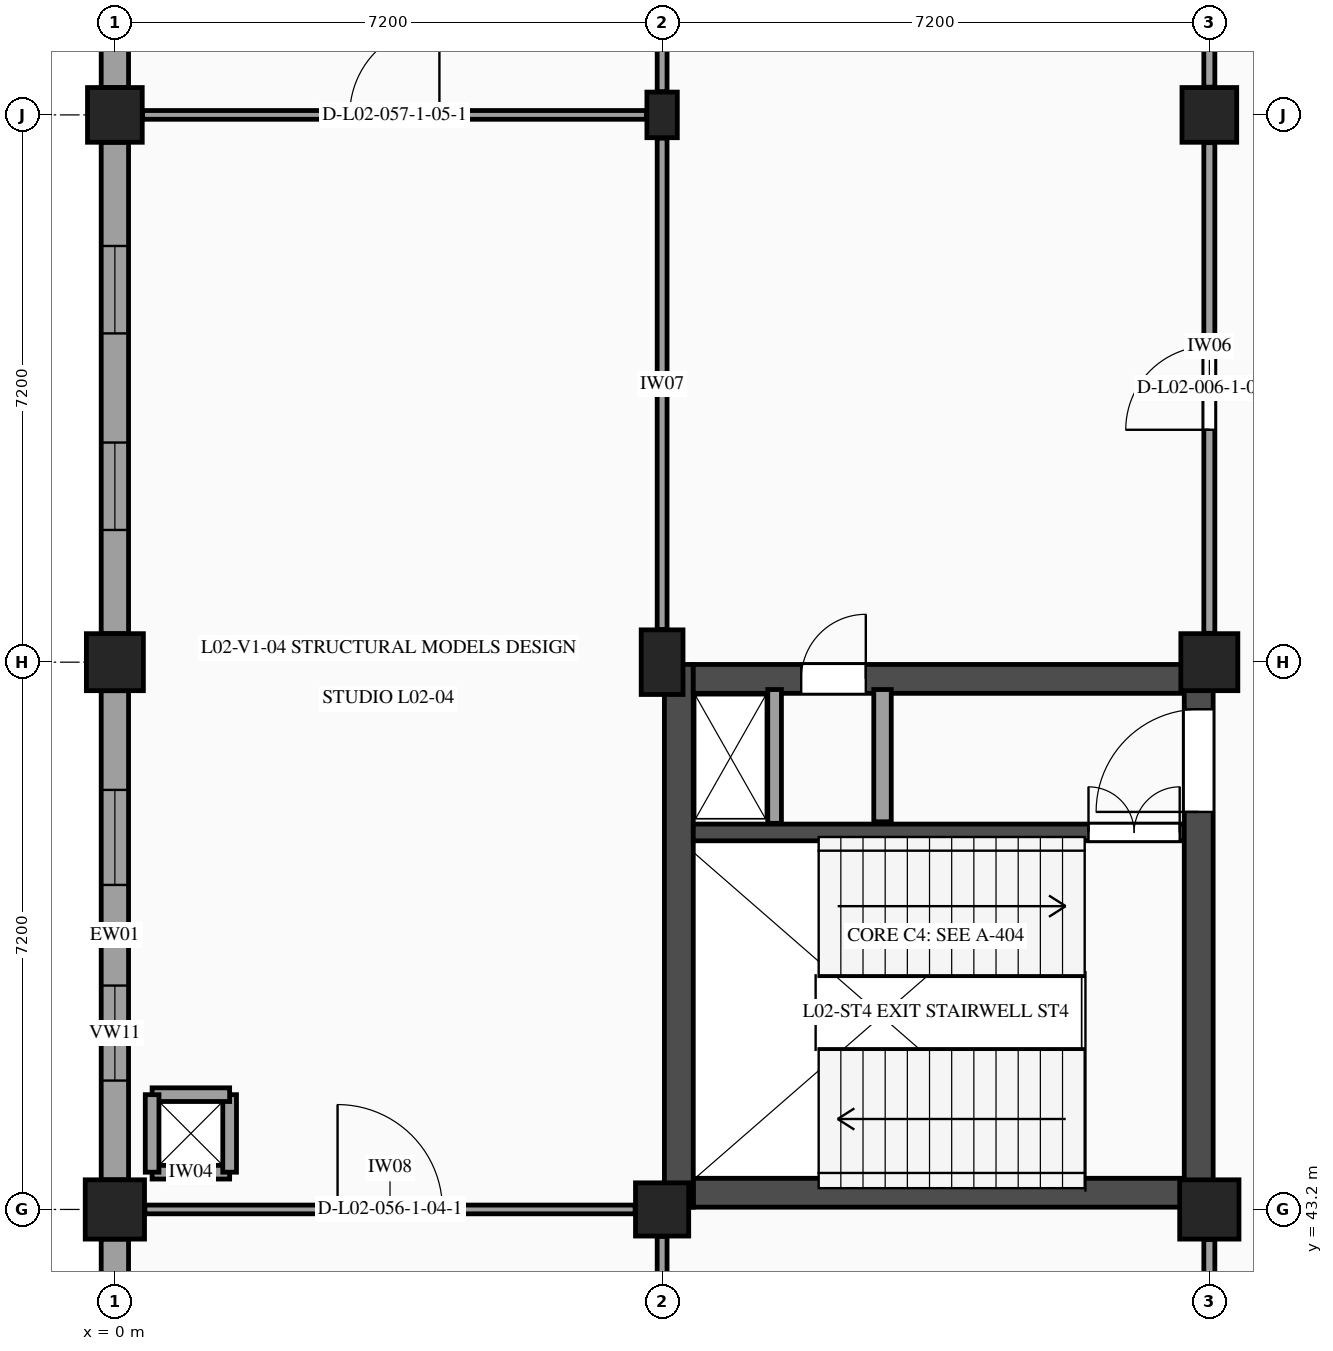
"""IFC4 building model, lengths in metres.
Left out: names, types, materials, properties, quantities, classifications, styles, units other than length and angle.
Written with IfcOpenShell. Run it as: python <this file> out.ifc"""

import sys

from ifc_helpers import new_model, si_unit, direction, frame, frame_2d, origin, origin_2d, place, context, subcontext, project, spatial, rectangle, extrude, element, fill, save


model = new_model("IFC4")
c1 = context("Model", 3, precision=1e-05, world=origin(), true_north=direction((0.0, 1.0)))
c2 = subcontext(c1, "Body", "Model", "MODEL_VIEW")
j1 = project(units=[si_unit("LENGTHUNIT", "METRE"), si_unit("PLANEANGLEUNIT", "RADIAN")], contexts=[c1])
p1 = place(None, origin())
s1 = spatial("IfcSite", under=j1, at=p1, CompositionType="ELEMENT")
p2 = place(p1, origin())
s2 = spatial("IfcBuilding", under=s1, at=p2, CompositionType="ELEMENT")
p3 = place(p2, frame((0.0, 0.0, 9.9)))
s3 = spatial("IfcBuildingStorey", under=s2, at=p3, CompositionType="ELEMENT", Elevation=9.9)
p4 = place(p3, frame((0.0, 43.2, 0.0), z_axis=(0.0, 0.0, 1.0), x_axis=(1.0, 0.0, 0.0)))
e1 = element("IfcColumn", 1, at=p4, inside=s3, PredefinedType="COLUMN", context=c2, shape_type="SweptSolid", body=[
    extrude(rectangle(XDim=0.78, YDim=0.78, at=origin_2d()), origin(), (0.0, 0.0, 1.0), 4.5),
])
p5 = place(p3, frame((0.0, 50.4, 0.0), z_axis=(0.0, 0.0, 1.0), x_axis=(1.0, 0.0, 0.0)))
e2 = element("IfcColumn", 2, at=p5, inside=s3, PredefinedType="COLUMN", context=c2, shape_type="SweptSolid", body=[
    extrude(rectangle(XDim=0.75, YDim=0.75, at=origin_2d()), origin(), (0.0, 0.0, 1.0), 4.5),
])
p6 = place(p3, frame((0.0, 57.6, 0.0), z_axis=(0.0, 0.0, 1.0), x_axis=(1.0, 0.0, 0.0)))
e3 = element("IfcColumn", 3, at=p6, inside=s3, PredefinedType="COLUMN", context=c2, shape_type="SweptSolid", body=[
    extrude(rectangle(XDim=0.72, YDim=0.72, at=origin_2d()), origin(), (0.0, 0.0, 1.0), 4.5),
])
p7 = place(p3, frame((7.2, 43.2, 0.0), z_axis=(0.0, 0.0, 1.0), x_axis=(1.0, 0.0, 0.0)))
e4 = element("IfcColumn", 4, at=p7, inside=s3, PredefinedType="COLUMN", context=c2, shape_type="SweptSolid", body=[
    extrude(rectangle(XDim=0.7, YDim=0.7, at=origin_2d()), origin(), (0.0, 0.0, 1.0), 4.5),
])
p8 = place(p3, frame((7.2, 50.4, 0.0), z_axis=(0.0, 0.0, 1.0), x_axis=(1.0, 0.0, 0.0)))
e5 = element("IfcColumn", 5, at=p8, inside=s3, PredefinedType="COLUMN", context=c2, shape_type="SweptSolid", body=[
    extrude(rectangle(XDim=0.55, YDim=0.85, at=origin_2d()), origin(), (0.0, 0.0, 1.0), 4.5),
])
p9 = place(p3, frame((7.2, 57.6, 0.0), z_axis=(0.0, 0.0, 1.0), x_axis=(1.0, 0.0, 0.0)))
e6 = element("IfcColumn", 6, at=p9, inside=s3, PredefinedType="PILASTER", context=c2, shape_type="SweptSolid", body=[
    extrude(rectangle(XDim=0.4, YDim=0.6, at=origin_2d()), origin(), (0.0, 0.0, 1.0), 4.5),
])
p10 = place(p3, frame((14.4, 43.2, 0.0), z_axis=(0.0, 0.0, 1.0), x_axis=(1.0, 0.0, 0.0)))
e7 = element("IfcColumn", 7, at=p10, inside=s3, PredefinedType="COLUMN", context=c2, shape_type="SweptSolid", body=[
    extrude(rectangle(XDim=0.78, YDim=0.78, at=origin_2d()), origin(), (0.0, 0.0, 1.0), 4.5),
])
p11 = place(p3, frame((14.4, 50.4, 0.0), z_axis=(0.0, 0.0, 1.0), x_axis=(1.0, 0.0, 0.0)))
e8 = element("IfcColumn", 8, at=p11, inside=s3, PredefinedType="COLUMN", context=c2, shape_type="SweptSolid", body=[
    extrude(rectangle(XDim=0.75, YDim=0.75, at=origin_2d()), origin(), (0.0, 0.0, 1.0), 4.5),
])
p12 = place(p3, frame((14.4, 57.6, 0.0), z_axis=(0.0, 0.0, 1.0), x_axis=(1.0, 0.0, 0.0)))
e9 = element("IfcColumn", 9, at=p12, inside=s3, PredefinedType="COLUMN", context=c2, shape_type="SweptSolid", body=[
    extrude(rectangle(XDim=0.72, YDim=0.72, at=origin_2d()), origin(), (0.0, 0.0, 1.0), 4.5),
])
p13 = place(p3, frame((0.0, 36.3, 0.0), z_axis=(0.0, 0.0, 1.0), x_axis=(0.0, 1.0, 0.0)))
e10 = element("IfcWall", 10, at=p13, inside=s3, PredefinedType="STANDARD", context=c2, shape_type="SweptSolid", body=[
    extrude(rectangle(XDim=6.51, YDim=0.36, at=frame_2d((3.255, 0.0))), origin(), (0.0, 0.0, 1.0), 3.47),
])
p14 = place(p13, frame((1.253, 0.0, 1.15)))
e11 = element("IfcOpeningElement", 11, at=p14, cuts=e10, PredefinedType="OPENING", context=c2, shape_type="SweptSolid", body=[
    extrude(rectangle(XDim=1.4, YDim=1.3, at=frame_2d((0.7, 0.65))), frame((0.0, 0.19, 0.0), z_axis=(0.0, -1.0, 0.0), x_axis=(1.0, 0.0, 0.0)), (0.0, 0.0, 1.0), 0.38),
])
p15 = place(p13, frame((3.857, 0.0, 1.15)))
e12 = element("IfcOpeningElement", 12, at=p15, cuts=e10, PredefinedType="OPENING", context=c2, shape_type="SweptSolid", body=[
    extrude(rectangle(XDim=1.4, YDim=1.3, at=frame_2d((0.7, 0.65))), frame((0.0, 0.19, 0.0), z_axis=(0.0, -1.0, 0.0), x_axis=(1.0, 0.0, 0.0)), (0.0, 0.0, 1.0), 0.38),
])
p16 = place(p3, frame((0.0, 43.59, 0.0), z_axis=(0.0, 0.0, 1.0), x_axis=(0.0, 1.0, 0.0)))
e13 = element("IfcWall", 13, at=p16, inside=s3, PredefinedType="STANDARD", context=c2, shape_type="SweptSolid", body=[
    extrude(rectangle(XDim=6.435, YDim=0.36, at=frame_2d((3.217, 0.0))), origin(), (0.0, 0.0, 1.0), 3.47),
])
p17 = place(p16, frame((1.305, 0.0, 1.15)))
e14 = element("IfcOpeningElement", 14, at=p17, cuts=e13, PredefinedType="OPENING", context=c2, shape_type="SweptSolid", body=[
    extrude(rectangle(XDim=1.25, YDim=1.25, at=frame_2d((0.625, 0.625))), frame((0.0, 0.19, 0.0), z_axis=(0.0, -1.0, 0.0), x_axis=(1.0, 0.0, 0.0)), (0.0, 0.0, 1.0), 0.38),
])
p18 = place(p16, frame((3.879, 0.0, 1.15)))
e15 = element("IfcOpeningElement", 15, at=p18, cuts=e13, PredefinedType="OPENING", context=c2, shape_type="SweptSolid", body=[
    extrude(rectangle(XDim=1.25, YDim=1.25, at=frame_2d((0.625, 0.625))), frame((0.0, 0.19, 0.0), z_axis=(0.0, -1.0, 0.0), x_axis=(1.0, 0.0, 0.0)), (0.0, 0.0, 1.0), 0.38),
])
p19 = place(p3, frame((0.0, 50.775, 0.0), z_axis=(0.0, 0.0, 1.0), x_axis=(0.0, 1.0, 0.0)))
e16 = element("IfcWall", 16, at=p19, inside=s3, PredefinedType="STANDARD", context=c2, shape_type="SweptSolid", body=[
    extrude(rectangle(XDim=6.465, YDim=0.36, at=frame_2d((3.232, 0.0))), origin(), (0.0, 0.0, 1.0), 3.47),
])
p20 = place(p19, frame((1.365, 0.0, 1.15)))
e17 = element("IfcOpeningElement", 17, at=p20, cuts=e16, PredefinedType="OPENING", context=c2, shape_type="SweptSolid", body=[
    extrude(rectangle(XDim=1.15, YDim=1.2, at=frame_2d((0.575, 0.6))), frame((0.0, 0.19, 0.0), z_axis=(0.0, -1.0, 0.0), x_axis=(1.0, 0.0, 0.0)), (0.0, 0.0, 1.0), 0.38),
])
p21 = place(p19, frame((3.95, 0.0, 1.15)))
e18 = element("IfcOpeningElement", 18, at=p21, cuts=e16, PredefinedType="OPENING", context=c2, shape_type="SweptSolid", body=[
    extrude(rectangle(XDim=1.15, YDim=1.2, at=frame_2d((0.575, 0.6))), frame((0.0, 0.19, 0.0), z_axis=(0.0, -1.0, 0.0), x_axis=(1.0, 0.0, 0.0)), (0.0, 0.0, 1.0), 0.38),
])
p22 = place(p3, frame((0.0, 57.96, 0.0), z_axis=(0.0, 0.0, 1.0), x_axis=(0.0, 1.0, 0.0)))
e19 = element("IfcWall", 19, at=p22, inside=s3, PredefinedType="STANDARD", context=c2, shape_type="SweptSolid", body=[
    extrude(rectangle(XDim=6.49, YDim=0.36, at=frame_2d((3.245, 0.0))), origin(), (0.0, 0.0, 1.0), 3.47),
])
p23 = place(p22, frame((1.447, 0.0, 1.15)))
e20 = element("IfcOpeningElement", 20, at=p23, cuts=e19, PredefinedType="OPENING", context=c2, shape_type="SweptSolid", body=[
    extrude(rectangle(XDim=1.0, YDim=1.2, at=frame_2d((0.5, 0.6))), frame((0.0, 0.19, 0.0), z_axis=(0.0, -1.0, 0.0), x_axis=(1.0, 0.0, 0.0)), (0.0, 0.0, 1.0), 0.38),
])
p24 = place(p22, frame((4.043, 0.0, 1.15)))
e21 = element("IfcOpeningElement", 21, at=p24, cuts=e19, PredefinedType="OPENING", context=c2, shape_type="SweptSolid", body=[
    extrude(rectangle(XDim=1.0, YDim=1.2, at=frame_2d((0.5, 0.6))), frame((0.0, 0.19, 0.0), z_axis=(0.0, -1.0, 0.0), x_axis=(1.0, 0.0, 0.0)), (0.0, 0.0, 1.0), 0.38),
])
p25 = place(p3, frame((7.61, 43.42, 0.0), z_axis=(0.0, 0.0, 1.0), x_axis=(1.0, 0.0, 0.0)))
e22 = element("IfcWall", 22, at=p25, inside=s3, PredefinedType="SHEAR", context=c2, shape_type="SweptSolid", body=[
    extrude(rectangle(XDim=6.46, YDim=0.38, at=frame_2d((3.23, 0.0))), origin(), (0.0, 0.0, 1.0), 4.225),
])
p26 = place(p3, frame((7.42, 50.37, 0.0), z_axis=(0.0, 0.0, 1.0), x_axis=(0.0, -1.0, 0.0)))
e23 = element("IfcWall", 23, at=p26, inside=s3, PredefinedType="SHEAR", context=c2, shape_type="SweptSolid", body=[
    extrude(rectangle(XDim=7.14, YDim=0.38, at=frame_2d((3.57, 0.0))), origin(), (0.0, 0.0, 1.0), 4.225),
])
p27 = place(p3, frame((7.61, 50.18, 0.0), z_axis=(0.0, 0.0, 1.0), x_axis=(1.0, 0.0, 0.0)))
e24 = element("IfcWall", 24, at=p27, inside=s3, PredefinedType="SHEAR", context=c2, shape_type="SweptSolid", body=[
    extrude(rectangle(XDim=6.46, YDim=0.38, at=frame_2d((3.23, 0.0))), origin(), (0.0, 0.0, 1.0), 4.225),
])
p28 = place(p27, frame((1.42, 0.0, 0.0)))
e25 = element("IfcOpeningElement", 25, at=p28, cuts=e24, PredefinedType="OPENING", context=c2, shape_type="SweptSolid", body=[
    extrude(rectangle(XDim=0.85, YDim=2.1, at=frame_2d((0.425, 1.05))), frame((0.0, 0.2, 0.0), z_axis=(0.0, -1.0, 0.0), x_axis=(1.0, 0.0, 0.0)), (0.0, 0.0, 1.0), 0.4),
])
p29 = place(p3, frame((7.61, 48.16, 0.0), z_axis=(0.0, 0.0, 1.0), x_axis=(1.0, 0.0, 0.0)))
e26 = element("IfcWall", 26, at=p29, inside=s3, PredefinedType="SHEAR", context=c2, shape_type="SweptSolid", body=[
    extrude(rectangle(XDim=6.46, YDim=0.22, at=frame_2d((3.23, 0.0))), origin(), (0.0, 0.0, 1.0), 4.225),
])
p30 = place(p29, frame((5.2, 0.0, 0.0)))
e27 = element("IfcOpeningElement", 27, at=p30, cuts=e26, PredefinedType="OPENING", context=c2, shape_type="SweptSolid", body=[
    extrude(rectangle(XDim=1.2, YDim=2.2, at=frame_2d((0.6, 1.1))), frame((0.0, 0.12, 0.0), z_axis=(0.0, -1.0, 0.0), x_axis=(1.0, 0.0, 0.0)), (0.0, 0.0, 1.0), 0.24),
])
p31 = place(p3, frame((10.1, 48.3, 0.0), z_axis=(0.0, 0.0, 1.0), x_axis=(0.0, 1.0, 0.0)))
e28 = element("IfcWall", 28, at=p31, inside=s3, PredefinedType="PARTITIONING", context=c2, shape_type="SweptSolid", body=[
    extrude(rectangle(XDim=1.74, YDim=0.23, at=frame_2d((0.87, 0.0))), origin(), (0.0, 0.0, 1.0), 4.225),
])
p32 = place(p3, frame((8.68, 48.28, 0.0), z_axis=(0.0, 0.0, 1.0), x_axis=(0.0, 1.0, 0.0)))
e29 = element("IfcWall", 29, at=p32, inside=s3, PredefinedType="PARTITIONING", context=c2, shape_type="SweptSolid", body=[
    extrude(rectangle(XDim=1.76, YDim=0.18, at=frame_2d((0.88, 0.0))), origin(), (0.0, 0.0, 1.0), 4.225),
])
p33 = place(p3, frame((14.26, 43.23, 0.0), z_axis=(0.0, 0.0, 1.0), x_axis=(0.0, 1.0, 0.0)))
e30 = element("IfcWall", 30, at=p33, inside=s3, PredefinedType="SHEAR", context=c2, shape_type="SweptSolid", body=[
    extrude(rectangle(XDim=7.14, YDim=0.38, at=frame_2d((3.57, 0.0))), origin(), (0.0, 0.0, 1.0), 4.225),
])
p34 = place(p33, frame((5.2, 0.0, 0.0)))
e31 = element("IfcOpeningElement", 31, at=p34, cuts=e30, PredefinedType="OPENING", context=c2, shape_type="SweptSolid", body=[
    extrude(rectangle(XDim=1.35, YDim=2.15, at=frame_2d((0.675, 1.075))), frame((0.0, 0.2, 0.0), z_axis=(0.0, -1.0, 0.0), x_axis=(1.0, 0.0, 0.0)), (0.0, 0.0, 1.0), 0.4),
])
for number, where, z_axis, x_axis in (
    (32, (0.49, 43.69, 0.0), (0.0, 0.0, 1.0), (1.0, 0.0, 0.0)),
    (33, (1.51, 43.69, 0.0), (0.0, 0.0, 1.0), (0.0, 1.0, 0.0)),
    (34, (1.51, 44.71, 0.0), (0.0, 0.0, 1.0), (-1.0, 0.0, 0.0)),
    (35, (0.49, 44.71, 0.0), (0.0, 0.0, 1.0), (0.0, -1.0, 0.0)),
):
    element("IfcWall", number, at=place(p3, frame(where, z_axis=z_axis, x_axis=x_axis)), inside=s3, PredefinedType="PARTITIONING", context=c2, shape_type="SweptSolid", body=[
        extrude(rectangle(XDim=1.02, YDim=0.18, at=frame_2d((0.51, 0.0))), origin(), (0.0, 0.0, 1.0), 4.225),
    ])
p35 = place(p3, frame((7.2, 36.365, 0.0), z_axis=(0.0, 0.0, 1.0), x_axis=(0.0, 1.0, 0.0)))
e36 = element("IfcWall", 36, at=p35, inside=s3, PredefinedType="PARTITIONING", context=c2, shape_type="SweptSolid", body=[
    extrude(rectangle(XDim=6.48, YDim=0.13, at=frame_2d((3.24, 0.0))), origin(), (0.0, 0.0, 1.0), 3.59),
])
p36 = place(p3, frame((0.395, 43.2, 0.0), z_axis=(0.0, 0.0, 1.0), x_axis=(1.0, 0.0, 0.0)))
e37 = element("IfcWall", 37, at=p36, inside=s3, PredefinedType="PARTITIONING", context=c2, shape_type="SweptSolid", body=[
    extrude(rectangle(XDim=6.45, YDim=0.115, at=frame_2d((3.225, 0.0))), origin(), (0.0, 0.0, 1.0), 3.485),
])
p37 = place(p36, frame((2.535, 0.0, 0.0)))
e38 = element("IfcOpeningElement", 38, at=p37, cuts=e37, PredefinedType="OPENING", context=c2, shape_type="SweptSolid", body=[
    extrude(rectangle(XDim=1.38, YDim=2.22, at=frame_2d((0.69, 1.11))), frame((0.0, 0.067, 0.0), z_axis=(0.0, -1.0, 0.0), x_axis=(1.0, 0.0, 0.0)), (0.0, 0.0, 1.0), 0.135),
])
p38 = place(p3, frame((7.2, 50.83, 0.0), z_axis=(0.0, 0.0, 1.0), x_axis=(0.0, 1.0, 0.0)))
e39 = element("IfcWall", 39, at=p38, inside=s3, PredefinedType="PARTITIONING", context=c2, shape_type="SweptSolid", body=[
    extrude(rectangle(XDim=6.465, YDim=0.13, at=frame_2d((3.232, 0.0))), origin(), (0.0, 0.0, 1.0), 3.54),
])
p39 = place(p3, frame((0.365, 57.6, 0.0), z_axis=(0.0, 0.0, 1.0), x_axis=(1.0, 0.0, 0.0)))
e40 = element("IfcWall", 40, at=p39, inside=s3, PredefinedType="PARTITIONING", context=c2, shape_type="SweptSolid", body=[
    extrude(rectangle(XDim=6.63, YDim=0.115, at=frame_2d((3.315, 0.0))), origin(), (0.0, 0.0, 1.0), 3.485),
])
p40 = place(p39, frame((2.725, 0.0, 0.0)))
e41 = element("IfcOpeningElement", 41, at=p40, cuts=e40, PredefinedType="OPENING", context=c2, shape_type="SweptSolid", body=[
    extrude(rectangle(XDim=1.18, YDim=2.18, at=frame_2d((0.59, 1.09))), frame((0.0, 0.067, 0.0), z_axis=(0.0, -1.0, 0.0), x_axis=(1.0, 0.0, 0.0)), (0.0, 0.0, 1.0), 0.135),
])
p41 = place(p3, frame((7.2, 57.905, 0.0), z_axis=(0.0, 0.0, 1.0), x_axis=(0.0, 1.0, 0.0)))
e42 = element("IfcWall", 42, at=p41, inside=s3, PredefinedType="PARTITIONING", context=c2, shape_type="SweptSolid", body=[
    extrude(rectangle(XDim=6.5, YDim=0.13, at=frame_2d((3.25, 0.0))), origin(), (0.0, 0.0, 1.0), 3.535),
])
p42 = place(p3, frame((14.4, 36.305, 0.0), z_axis=(0.0, 0.0, 1.0), x_axis=(0.0, 1.0, 0.0)))
e43 = element("IfcWall", 43, at=p42, inside=s3, PredefinedType="PARTITIONING", context=c2, shape_type="SweptSolid", body=[
    extrude(rectangle(XDim=6.5, YDim=0.145, at=frame_2d((3.25, 0.0))), origin(), (0.0, 0.0, 1.0), 3.59),
])
p43 = place(p3, frame((14.4, 50.78, 0.0), z_axis=(0.0, 0.0, 1.0), x_axis=(0.0, 1.0, 0.0)))
e44 = element("IfcWall", 44, at=p43, inside=s3, PredefinedType="PARTITIONING", context=c2, shape_type="SweptSolid", body=[
    extrude(rectangle(XDim=6.455, YDim=0.145, at=frame_2d((3.228, 0.0))), origin(), (0.0, 0.0, 1.0), 3.54),
])
p44 = place(p43, frame((2.677, 0.0, 0.0)))
e45 = element("IfcOpeningElement", 45, at=p44, cuts=e44, PredefinedType="OPENING", context=c2, shape_type="SweptSolid", body=[
    extrude(rectangle(XDim=1.1, YDim=2.15, at=frame_2d((0.55, 1.075))), frame((0.0, 0.083, 0.0), z_axis=(0.0, -1.0, 0.0), x_axis=(1.0, 0.0, 0.0)), (0.0, 0.0, 1.0), 0.165),
])
p45 = place(p3, frame((14.4, 57.965, 0.0), z_axis=(0.0, 0.0, 1.0), x_axis=(0.0, 1.0, 0.0)))
e46 = element("IfcWall", 46, at=p45, inside=s3, PredefinedType="PARTITIONING", context=c2, shape_type="SweptSolid", body=[
    extrude(rectangle(XDim=6.48, YDim=0.145, at=frame_2d((3.24, 0.0))), origin(), (0.0, 0.0, 1.0), 3.535),
])
p46 = place(p17, origin())
e47 = element("IfcWindow", 47, at=p46, inside=s3, PartitioningType="SINGLE_PANEL", PredefinedType="WINDOW", context=c2, shape_type="SweptSolid", body=[
    extrude(rectangle(XDim=1.25, YDim=1.25, at=frame_2d((0.625, 0.625))), frame((0.0, -0.08, 0.0), z_axis=(0.0, -1.0, 0.0), x_axis=(1.0, 0.0, 0.0)), (0.0, 0.0, 1.0), 0.06),
])
fill(e14, e47)
p47 = place(p18, origin())
e48 = element("IfcWindow", 48, at=p47, inside=s3, PartitioningType="SINGLE_PANEL", PredefinedType="WINDOW", context=c2, shape_type="SweptSolid", body=[
    extrude(rectangle(XDim=1.25, YDim=1.25, at=frame_2d((0.625, 0.625))), frame((0.0, -0.08, 0.0), z_axis=(0.0, -1.0, 0.0), x_axis=(1.0, 0.0, 0.0)), (0.0, 0.0, 1.0), 0.06),
])
fill(e15, e48)
p48 = place(p20, origin())
e49 = element("IfcWindow", 49, at=p48, inside=s3, PartitioningType="SINGLE_PANEL", PredefinedType="WINDOW", context=c2, shape_type="SweptSolid", body=[
    extrude(rectangle(XDim=1.15, YDim=1.2, at=frame_2d((0.575, 0.6))), frame((0.0, -0.08, 0.0), z_axis=(0.0, -1.0, 0.0), x_axis=(1.0, 0.0, 0.0)), (0.0, 0.0, 1.0), 0.06),
])
fill(e17, e49)
p49 = place(p21, origin())
e50 = element("IfcWindow", 50, at=p49, inside=s3, PartitioningType="SINGLE_PANEL", PredefinedType="WINDOW", context=c2, shape_type="SweptSolid", body=[
    extrude(rectangle(XDim=1.15, YDim=1.2, at=frame_2d((0.575, 0.6))), frame((0.0, -0.08, 0.0), z_axis=(0.0, -1.0, 0.0), x_axis=(1.0, 0.0, 0.0)), (0.0, 0.0, 1.0), 0.06),
])
fill(e18, e50)
p50 = place(p28, origin())
e51 = element("IfcDoor", 51, at=p50, inside=s3, OperationType="SINGLE_SWING_RIGHT", PredefinedType="DOOR", context=c2, shape_type="SweptSolid", body=[
    extrude(rectangle(XDim=0.85, YDim=2.1, at=frame_2d((0.425, 1.05))), frame((0.0, 0.025, 0.0), z_axis=(0.0, -1.0, 0.0), x_axis=(1.0, 0.0, 0.0)), (0.0, 0.0, 1.0), 0.05),
])
fill(e25, e51)
p51 = place(p30, origin())
e52 = element("IfcDoor", 52, at=p51, inside=s3, OperationType="DOUBLE_DOOR_SINGLE_SWING", PredefinedType="DOOR", context=c2, shape_type="SweptSolid", body=[
    extrude(rectangle(XDim=1.2, YDim=2.2, at=frame_2d((0.6, 1.1))), frame((0.0, 0.025, 0.0), z_axis=(0.0, -1.0, 0.0), x_axis=(1.0, 0.0, 0.0)), (0.0, 0.0, 1.0), 0.05),
])
fill(e27, e52)
p52 = place(p34, origin())
e53 = element("IfcDoor", 53, at=p52, inside=s3, OperationType="SINGLE_SWING_LEFT", PredefinedType="DOOR", context=c2, shape_type="SweptSolid", body=[
    extrude(rectangle(XDim=1.35, YDim=2.15, at=frame_2d((0.675, 1.075))), frame((0.0, 0.025, 0.0), z_axis=(0.0, -1.0, 0.0), x_axis=(1.0, 0.0, 0.0)), (0.0, 0.0, 1.0), 0.05),
])
fill(e31, e53)
p53 = place(p44, origin())
e54 = element("IfcDoor", 54, at=p53, inside=s3, OperationType="SINGLE_SWING_LEFT", PredefinedType="DOOR", context=c2, shape_type="SweptSolid", body=[
    extrude(rectangle(XDim=1.1, YDim=2.15, at=frame_2d((0.55, 1.075))), frame((0.0, 0.025, 0.0), z_axis=(0.0, -1.0, 0.0), x_axis=(1.0, 0.0, 0.0)), (0.0, 0.0, 1.0), 0.05),
])
fill(e45, e54)
p54 = place(p37, origin())
e55 = element("IfcDoor", 55, at=p54, inside=s3, OperationType="SINGLE_SWING_LEFT", PredefinedType="DOOR", context=c2, shape_type="SweptSolid", body=[
    extrude(rectangle(XDim=1.38, YDim=2.22, at=frame_2d((0.69, 1.11))), frame((0.0, 0.025, 0.0), z_axis=(0.0, -1.0, 0.0), x_axis=(1.0, 0.0, 0.0)), (0.0, 0.0, 1.0), 0.05),
])
fill(e38, e55)
p55 = place(p40, origin())
e56 = element("IfcDoor", 56, at=p55, inside=s3, OperationType="SINGLE_SWING_RIGHT", PredefinedType="DOOR", context=c2, shape_type="SweptSolid", body=[
    extrude(rectangle(XDim=1.18, YDim=2.18, at=frame_2d((0.59, 1.09))), frame((0.0, 0.025, 0.0), z_axis=(0.0, -1.0, 0.0), x_axis=(1.0, 0.0, 0.0)), (0.0, 0.0, 1.0), 0.05),
])
fill(e41, e56)
save(model, sys.argv[1])
